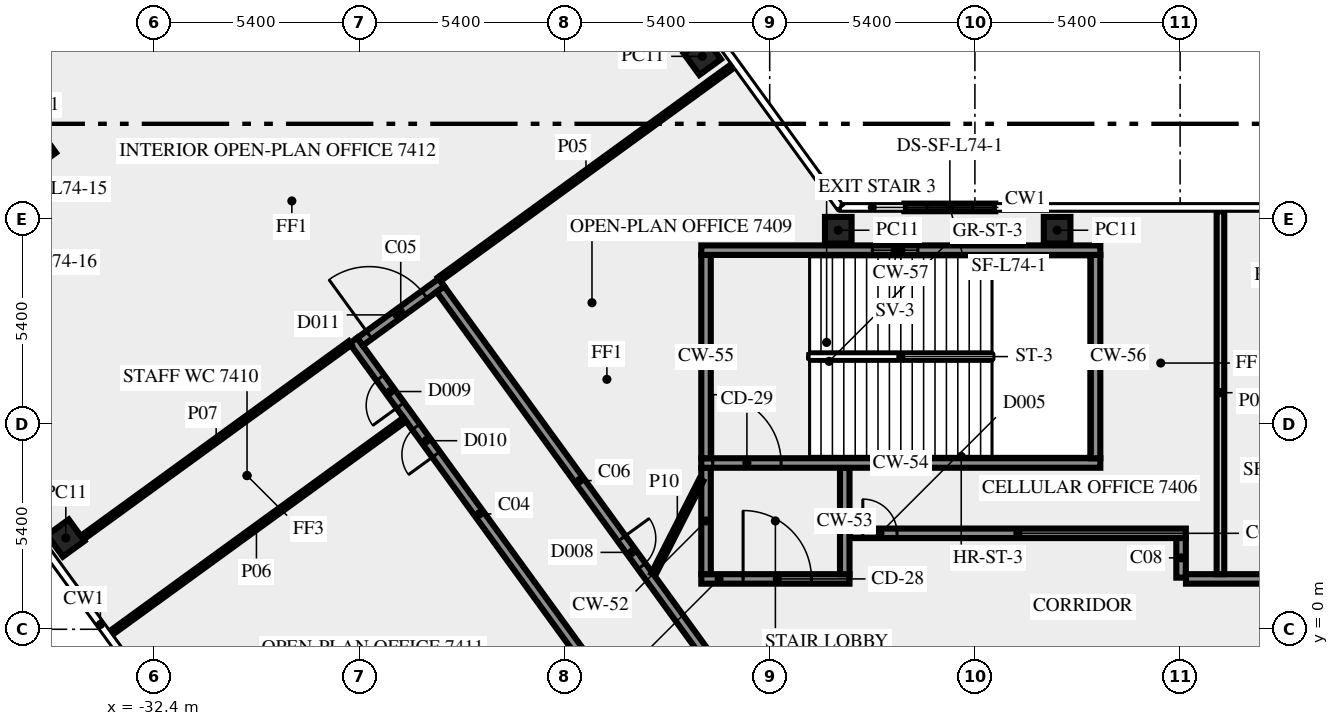
"""IFC4 building model, lengths in metres.
Left out: names, types, materials, properties, quantities, classifications, styles, units other than length and angle.
Written with IfcOpenShell. Run it as: python <this file> out.ifc"""

import sys

from ifc_helpers import new_model, si_unit, direction, frame, frame_2d, origin, origin_2d, place, context, subcontext, project, spatial, rectangle, extrude, element, fill, save


model = new_model("IFC4")
c1 = context("Model", 3, precision=1e-05, world=origin(), true_north=direction((0.0, 1.0)))
c2 = subcontext(c1, "Body", "Model", "MODEL_VIEW")
j1 = project(units=[si_unit("LENGTHUNIT", "METRE"), si_unit("PLANEANGLEUNIT", "RADIAN")], contexts=[c1])
p1 = place(None, origin())
s1 = spatial("IfcSite", under=j1, at=p1, CompositionType="ELEMENT")
p2 = place(p1, origin())
s2 = spatial("IfcBuilding", under=s1, at=p2, CompositionType="ELEMENT")
p3 = place(p2, frame((0.0, 0.0, 319.0)))
s3 = spatial("IfcBuildingStorey", under=s2, at=p3, CompositionType="ELEMENT", Elevation=319.0)
for number, where, z_axis, x_axis in (
    (1, (-17.974, 15.075, 0.0), (0.0, 0.0, 1.0), (-0.588, 0.809, 0.0)),
    (2, (-35.471, 12.616, 0.0), (0.0, 0.0, 1.0), (-0.809, -0.588, 0.0)),
    (3, (-34.722, 2.4, 0.0), (0.0, 0.0, 1.0), (0.588, -0.809, 0.0)),
    (4, (-8.637, 10.5, 0.0), (0.0, 0.0, 1.0), (-1.0, 0.0, 0.0)),
    (5, (-14.395, 10.5, 0.0), (0.0, 0.0, 1.0), (-1.0, 0.0, 0.0)),
):
    element("IfcColumn", number, at=place(p3, frame(where, z_axis=z_axis, x_axis=x_axis)), inside=s3, PredefinedType="COLUMN", context=c2, shape_type="SweptSolid", body=[
        extrude(rectangle(XDim=0.7, YDim=0.7, at=origin_2d()), origin(), (0.0, 0.0, 1.0), 3.65),
    ])
p4 = place(p3, frame((-10.263, 11.1, 0.0), z_axis=(0.0, 0.0, 1.0), x_axis=(-1.0, 0.0, 0.0)))
e6 = element("IfcWall", 6, at=p4, inside=s3, PredefinedType="SOLIDWALL", context=c2, shape_type="SweptSolid", body=[
    extrude(rectangle(XDim=2.392, YDim=0.2, at=frame_2d((1.196, 0.0))), origin(), (0.0, 0.0, 1.0), 3.65),
])
p5 = place(p4, frame((0.596, 0.0, 1.0)))
e7 = element("IfcOpeningElement", 7, at=p5, cuts=e6, PredefinedType="OPENING", context=c2, shape_type="SweptSolid", body=[
    extrude(rectangle(XDim=1.2, YDim=1.2, at=frame_2d((0.6, 0.6))), frame((0.0, 0.11, 0.0), z_axis=(0.0, -1.0, 0.0), x_axis=(1.0, 0.0, 0.0)), (0.0, 0.0, 1.0), 0.22),
])
p6 = place(p3, frame((-18.0, 1.325, 0.0), z_axis=(0.0, 0.0, 1.0), x_axis=(1.0, 0.0, 0.0)))
e8 = element("IfcWall", 8, at=p6, inside=s3, PredefinedType="SHEAR", context=c2, shape_type="SweptSolid", body=[
    extrude(rectangle(XDim=3.9, YDim=0.25, at=frame_2d((1.95, 0.0))), origin(), (0.0, 0.0, 1.0), 3.65),
])
p7 = place(p6, frame((1.1, 0.0, 0.0)))
e9 = element("IfcOpeningElement", 9, at=p7, cuts=e8, PredefinedType="OPENING", context=c2, shape_type="SweptSolid", body=[
    extrude(rectangle(XDim=1.8, YDim=2.1, at=frame_2d((0.9, 1.05))), frame((0.0, 0.135, 0.0), z_axis=(0.0, -1.0, 0.0), x_axis=(1.0, 0.0, 0.0)), (0.0, 0.0, 1.0), 0.27),
])
for number, where, z_axis, x_axis in (
    (10, (-17.875, 1.45, 0.0), (0.0, 0.0, 1.0), (0.0, 1.0, 0.0)),
    (11, (-14.225, 1.45, 0.0), (0.0, 0.0, 1.0), (0.0, 1.0, 0.0)),
):
    element("IfcWall", number, at=place(p3, frame(where, z_axis=z_axis, x_axis=x_axis)), inside=s3, PredefinedType="SHEAR", context=c2, shape_type="SweptSolid", body=[
        extrude(rectangle(XDim=2.8, YDim=0.25, at=frame_2d((1.4, 0.0))), origin(), (0.0, 0.0, 1.0), 3.65),
    ])
p8 = place(p3, frame((-18.0, 4.375, 0.0), z_axis=(0.0, 0.0, 1.0), x_axis=(1.0, 0.0, 0.0)))
e12 = element("IfcWall", 12, at=p8, inside=s3, PredefinedType="SHEAR", context=c2, shape_type="SweptSolid", body=[
    extrude(rectangle(XDim=10.5, YDim=0.25, at=frame_2d((5.25, 0.0))), origin(), (0.0, 0.0, 1.0), 3.65),
])
p9 = place(p8, frame((0.3, 0.0, 0.0)))
e13 = element("IfcOpeningElement", 13, at=p9, cuts=e12, PredefinedType="OPENING", context=c2, shape_type="SweptSolid", body=[
    extrude(rectangle(XDim=1.8, YDim=2.1, at=frame_2d((0.9, 1.05))), frame((0.0, 0.135, 0.0), z_axis=(0.0, -1.0, 0.0), x_axis=(1.0, 0.0, 0.0)), (0.0, 0.0, 1.0), 0.27),
])
for number, where, z_axis, x_axis in (
    (14, (-17.875, 4.5, 0.0), (0.0, 0.0, 1.0), (0.0, 1.0, 0.0)),
    (15, (-7.625, 4.5, 0.0), (0.0, 0.0, 1.0), (0.0, 1.0, 0.0)),
):
    element("IfcWall", number, at=place(p3, frame(where, z_axis=z_axis, x_axis=x_axis)), inside=s3, PredefinedType="SHEAR", context=c2, shape_type="SweptSolid", body=[
        extrude(rectangle(XDim=5.35, YDim=0.25, at=frame_2d((2.675, 0.0))), origin(), (0.0, 0.0, 1.0), 3.65),
    ])
p10 = place(p3, frame((-18.0, 9.975, 0.0), z_axis=(0.0, 0.0, 1.0), x_axis=(1.0, 0.0, 0.0)))
e16 = element("IfcWall", 16, at=p10, inside=s3, PredefinedType="SHEAR", context=c2, shape_type="SweptSolid", body=[
    extrude(rectangle(XDim=10.5, YDim=0.25, at=frame_2d((5.25, 0.0))), origin(), (0.0, 0.0, 1.0), 3.65),
])
p11 = place(p10, frame((4.5, 0.0, 1.0)))
e17 = element("IfcOpeningElement", 17, at=p11, cuts=e16, PredefinedType="OPENING", context=c2, shape_type="SweptSolid", body=[
    extrude(rectangle(XDim=1.2, YDim=1.2, at=frame_2d((0.6, 0.6))), frame((0.0, 0.135, 0.0), z_axis=(0.0, -1.0, 0.0), x_axis=(1.0, 0.0, 0.0)), (0.0, 0.0, 1.0), 0.27),
])
p12 = place(p3, frame((-20.531, -1.523, 0.0), z_axis=(0.0, 0.0, 1.0), x_axis=(-0.587782646447, 0.809018887626, 0.0)))
e18 = element("IfcWall", 18, at=p12, inside=s3, PredefinedType="SOLIDWALL", context=c2, shape_type="SweptSolid", body=[
    extrude(rectangle(XDim=11.27, YDim=0.25, at=frame_2d((5.635, 0.0))), origin(), (0.0, 0.0, 1.0), 3.65),
])
p13 = place(p12, frame((7.566, 0.0, 0.0)))
e19 = element("IfcOpeningElement", 19, at=p13, cuts=e18, PredefinedType="OPENING", context=c2, shape_type="SweptSolid", body=[
    extrude(rectangle(XDim=0.9, YDim=2.1, at=frame_2d((0.45, 1.05))), frame((0.0, 0.135, 0.0), z_axis=(0.0, -1.0, 0.0), x_axis=(1.0, 0.0, 0.0)), (0.0, 0.0, 1.0), 0.27),
])
p14 = place(p12, frame((9.165, 0.0, 0.0)))
e20 = element("IfcOpeningElement", 20, at=p14, cuts=e18, PredefinedType="OPENING", context=c2, shape_type="SweptSolid", body=[
    extrude(rectangle(XDim=0.9, YDim=2.1, at=frame_2d((0.45, 1.05))), frame((0.0, 0.135, 0.0), z_axis=(0.0, -1.0, 0.0), x_axis=(1.0, 0.0, 0.0)), (0.0, 0.0, 1.0), 0.27),
])
p15 = place(p3, frame((-26.981, 7.567, 0.0), z_axis=(0.0, 0.0, 1.0), x_axis=(0.809038743598, 0.587755315891, 0.0)))
e21 = element("IfcWall", 21, at=p15, inside=s3, PredefinedType="SOLIDWALL", context=c2, shape_type="SweptSolid", body=[
    extrude(rectangle(XDim=2.65, YDim=0.25, at=frame_2d((1.325, 0.0))), origin(), (0.0, 0.0, 1.0), 3.65),
])
p16 = place(p15, frame((0.3, 0.0, 0.0)))
e22 = element("IfcOpeningElement", 22, at=p16, cuts=e21, PredefinedType="OPENING", context=c2, shape_type="SweptSolid", body=[
    extrude(rectangle(XDim=1.8, YDim=2.1, at=frame_2d((0.9, 1.05))), frame((0.0, 0.135, 0.0), z_axis=(0.0, -1.0, 0.0), x_axis=(1.0, 0.0, 0.0)), (0.0, 0.0, 1.0), 0.27),
])
p17 = place(p3, frame((-24.865, 8.95, 0.0), z_axis=(0.0, 0.0, 1.0), x_axis=(0.587791617212, -0.809012369952, 0.0)))
e23 = element("IfcWall", 23, at=p17, inside=s3, PredefinedType="SOLIDWALL", context=c2, shape_type="SweptSolid", body=[
    extrude(rectangle(XDim=12.453, YDim=0.25, at=frame_2d((6.227, 0.0))), origin(), (0.0, 0.0, 1.0), 3.65),
])
p18 = place(p17, frame((8.112, 0.0, 0.0)))
e24 = element("IfcOpeningElement", 24, at=p18, cuts=e23, PredefinedType="OPENING", context=c2, shape_type="SweptSolid", body=[
    extrude(rectangle(XDim=0.9, YDim=2.1, at=frame_2d((0.45, 1.05))), frame((0.0, 0.135, 0.0), z_axis=(0.0, -1.0, 0.0), x_axis=(1.0, 0.0, 0.0)), (0.0, 0.0, 1.0), 0.27),
])
p19 = place(p3, frame((-14.09, 2.525, 0.0), z_axis=(0.0, 0.0, 1.0), x_axis=(1.0, 0.0, 0.0)))
e25 = element("IfcWall", 25, at=p19, inside=s3, PredefinedType="SOLIDWALL", context=c2, shape_type="SweptSolid", body=[
    extrude(rectangle(XDim=8.84, YDim=0.25, at=frame_2d((4.42, 0.0))), origin(), (0.0, 0.0, 1.0), 3.65),
])
p20 = place(p19, frame((0.34, 0.0, 0.0)))
e26 = element("IfcOpeningElement", 26, at=p20, cuts=e25, PredefinedType="OPENING", context=c2, shape_type="SweptSolid", body=[
    extrude(rectangle(XDim=0.9, YDim=2.1, at=frame_2d((0.45, 1.05))), frame((0.0, 0.135, 0.0), z_axis=(0.0, -1.0, 0.0), x_axis=(1.0, 0.0, 0.0)), (0.0, 0.0, 1.0), 0.27),
])
p21 = place(p3, frame((-5.375, 2.4, 0.0), z_axis=(0.0, 0.0, 1.0), x_axis=(0.0, -1.0, 0.0)))
e27 = element("IfcWall", 27, at=p21, inside=s3, PredefinedType="SOLIDWALL", context=c2, shape_type="SweptSolid", body=[
    extrude(rectangle(XDim=1.041, YDim=0.25, at=frame_2d((0.521, 0.0))), origin(), (0.0, 0.0, 1.0), 3.65),
])
p22 = place(p3, frame((-5.246, 1.325, 0.0), z_axis=(0.0, 0.0, 1.0), x_axis=(1.0, 0.0, 0.0)))
e28 = element("IfcWall", 28, at=p22, inside=s3, PredefinedType="SOLIDWALL", context=c2, shape_type="SweptSolid", body=[
    extrude(rectangle(XDim=19.336, YDim=0.25, at=frame_2d((9.668, 0.0))), origin(), (0.0, 0.0, 1.0), 3.65),
])
p23 = place(p22, frame((10.894, 0.0, 0.0)))
e29 = element("IfcOpeningElement", 29, at=p23, cuts=e28, PredefinedType="OPENING", context=c2, shape_type="SweptSolid", body=[
    extrude(rectangle(XDim=1.2, YDim=2.1, at=frame_2d((0.6, 1.05))), frame((0.0, 0.135, 0.0), z_axis=(0.0, -1.0, 0.0), x_axis=(1.0, 0.0, 0.0)), (0.0, 0.0, 1.0), 0.27),
])
p24 = place(p22, frame((18.096, 0.0, 0.0)))
e30 = element("IfcOpeningElement", 30, at=p24, cuts=e28, PredefinedType="OPENING", context=c2, shape_type="SweptSolid", body=[
    extrude(rectangle(XDim=0.9, YDim=2.1, at=frame_2d((0.45, 1.05))), frame((0.0, 0.135, 0.0), z_axis=(0.0, -1.0, 0.0), x_axis=(1.0, 0.0, 0.0)), (0.0, 0.0, 1.0), 0.27),
])
p25 = place(p3, frame((-4.339, 1.45, 0.0), z_axis=(0.0, 0.0, 1.0), x_axis=(0.0, 1.0, 0.0)))
e31 = element("IfcWall", 31, at=p25, inside=s3, PredefinedType="SOLIDWALL", context=c2, shape_type="SweptSolid", body=[
    extrude(rectangle(XDim=9.55, YDim=0.2, at=frame_2d((4.775, 0.0))), origin(), (0.0, 0.0, 1.0), 2.95),
])
p26 = place(p3, frame((-17.172, 14.823, 0.0), z_axis=(0.0, 0.0, 1.0), x_axis=(-0.809013490065, -0.587790075531, 0.0)))
e32 = element("IfcWall", 32, at=p26, inside=s3, PredefinedType="PARTITIONING", context=c2, shape_type="SweptSolid", body=[
    extrude(rectangle(XDim=9.549, YDim=0.12, at=frame_2d((4.775, 0.0))), origin(), (0.0, 0.0, 1.0), 2.95),
])
p27 = place(p3, frame((-25.802, 5.519, 0.0), z_axis=(0.0, 0.0, 1.0), x_axis=(-0.808994179369, -0.587816653173, 0.0)))
e33 = element("IfcWall", 33, at=p27, inside=s3, PredefinedType="PARTITIONING", context=c2, shape_type="SweptSolid", body=[
    extrude(rectangle(XDim=9.651, YDim=0.12, at=frame_2d((4.825, 0.0))), origin(), (0.0, 0.0, 1.0), 2.95),
])
p28 = place(p3, frame((-34.291, 2.41, 0.0), z_axis=(0.0, 0.0, 1.0), x_axis=(0.809027940177, 0.587770186393, 0.0)))
e34 = element("IfcWall", 34, at=p28, inside=s3, PredefinedType="PARTITIONING", context=c2, shape_type="SweptSolid", body=[
    extrude(rectangle(XDim=8.715, YDim=0.12, at=frame_2d((4.357, 0.0))), origin(), (0.0, 0.0, 1.0), 3.65),
])
p29 = place(p3, frame((-19.261, 1.45, 0.0), z_axis=(0.0, 0.0, 1.0), x_axis=(0.453950796792, 0.891026752736, 0.0)))
e35 = element("IfcWall", 35, at=p29, inside=s3, PredefinedType="PARTITIONING", context=c2, shape_type="SweptSolid", body=[
    extrude(rectangle(XDim=2.778, YDim=0.12, at=frame_2d((1.389, 0.0))), origin(), (0.0, 0.0, 1.0), 3.65),
])
p30 = place(p5, origin())
e36 = element("IfcWindow", 36, at=p30, inside=s3, PartitioningType="SINGLE_PANEL", PredefinedType="WINDOW", context=c2, shape_type="SweptSolid", body=[
    extrude(rectangle(XDim=1.2, YDim=1.2, at=frame_2d((0.6, 0.6))), frame((0.0, 0.03, 0.0), z_axis=(0.0, -1.0, 0.0), x_axis=(1.0, 0.0, 0.0)), (0.0, 0.0, 1.0), 0.06),
])
fill(e7, e36)
p31 = place(p7, origin())
e37 = element("IfcDoor", 37, at=p31, inside=s3, OperationType="DOUBLE_DOOR_SINGLE_SWING", PredefinedType="DOOR", context=c2, shape_type="SweptSolid", body=[
    extrude(rectangle(XDim=1.8, YDim=2.1, at=frame_2d((0.9, 1.05))), frame((0.0, 0.025, 0.0), z_axis=(0.0, -1.0, 0.0), x_axis=(1.0, 0.0, 0.0)), (0.0, 0.0, 1.0), 0.05),
])
fill(e9, e37)
p32 = place(p9, origin())
e38 = element("IfcDoor", 38, at=p32, inside=s3, OperationType="DOUBLE_DOOR_SINGLE_SWING", PredefinedType="DOOR", context=c2, shape_type="SweptSolid", body=[
    extrude(rectangle(XDim=1.8, YDim=2.1, at=frame_2d((0.9, 1.05))), frame((0.0, 0.025, 0.0), z_axis=(0.0, -1.0, 0.0), x_axis=(1.0, 0.0, 0.0)), (0.0, 0.0, 1.0), 0.05),
])
fill(e13, e38)
p33 = place(p11, origin())
e39 = element("IfcWindow", 39, at=p33, inside=s3, PartitioningType="SINGLE_PANEL", PredefinedType="WINDOW", context=c2, shape_type="SweptSolid", body=[
    extrude(rectangle(XDim=1.2, YDim=1.2, at=frame_2d((0.6, 0.6))), frame((0.0, 0.03, 0.0), z_axis=(0.0, -1.0, 0.0), x_axis=(1.0, 0.0, 0.0)), (0.0, 0.0, 1.0), 0.06),
])
fill(e17, e39)
p34 = place(p20, origin())
e40 = element("IfcDoor", 40, at=p34, inside=s3, OperationType="SINGLE_SWING_LEFT", PredefinedType="DOOR", context=c2, shape_type="SweptSolid", body=[
    extrude(rectangle(XDim=0.9, YDim=2.1, at=frame_2d((0.45, 1.05))), frame((0.0, 0.025, 0.0), z_axis=(0.0, -1.0, 0.0), x_axis=(1.0, 0.0, 0.0)), (0.0, 0.0, 1.0), 0.05),
])
fill(e26, e40)
p35 = place(p18, origin())
e41 = element("IfcDoor", 41, at=p35, inside=s3, OperationType="SINGLE_SWING_RIGHT", PredefinedType="DOOR", context=c2, shape_type="SweptSolid", body=[
    extrude(rectangle(XDim=0.9, YDim=2.1, at=frame_2d((0.45, 1.05))), frame((0.0, 0.025, 0.0), z_axis=(0.0, -1.0, 0.0), x_axis=(1.0, 0.0, 0.0)), (0.0, 0.0, 1.0), 0.05),
])
fill(e24, e41)
p36 = place(p13, origin())
e42 = element("IfcDoor", 42, at=p36, inside=s3, OperationType="SINGLE_SWING_RIGHT", PredefinedType="DOOR", context=c2, shape_type="SweptSolid", body=[
    extrude(rectangle(XDim=0.9, YDim=2.1, at=frame_2d((0.45, 1.05))), frame((0.0, 0.025, 0.0), z_axis=(0.0, -1.0, 0.0), x_axis=(1.0, 0.0, 0.0)), (0.0, 0.0, 1.0), 0.05),
])
fill(e19, e42)
p37 = place(p16, origin())
e43 = element("IfcDoor", 43, at=p37, inside=s3, OperationType="DOUBLE_DOOR_SINGLE_SWING", PredefinedType="DOOR", context=c2, shape_type="SweptSolid", body=[
    extrude(rectangle(XDim=1.8, YDim=2.1, at=frame_2d((0.9, 1.05))), frame((0.0, 0.025, 0.0), z_axis=(0.0, -1.0, 0.0), x_axis=(1.0, 0.0, 0.0)), (0.0, 0.0, 1.0), 0.05),
])
fill(e22, e43)
p38 = place(p14, origin())
e44 = element("IfcDoor", 44, at=p38, inside=s3, OperationType="SINGLE_SWING_LEFT", PredefinedType="DOOR", context=c2, shape_type="SweptSolid", body=[
    extrude(rectangle(XDim=0.9, YDim=2.1, at=frame_2d((0.45, 1.05))), frame((0.0, 0.025, 0.0), z_axis=(0.0, -1.0, 0.0), x_axis=(1.0, 0.0, 0.0)), (0.0, 0.0, 1.0), 0.05),
])
fill(e20, e44)
save(model, sys.argv[1])
